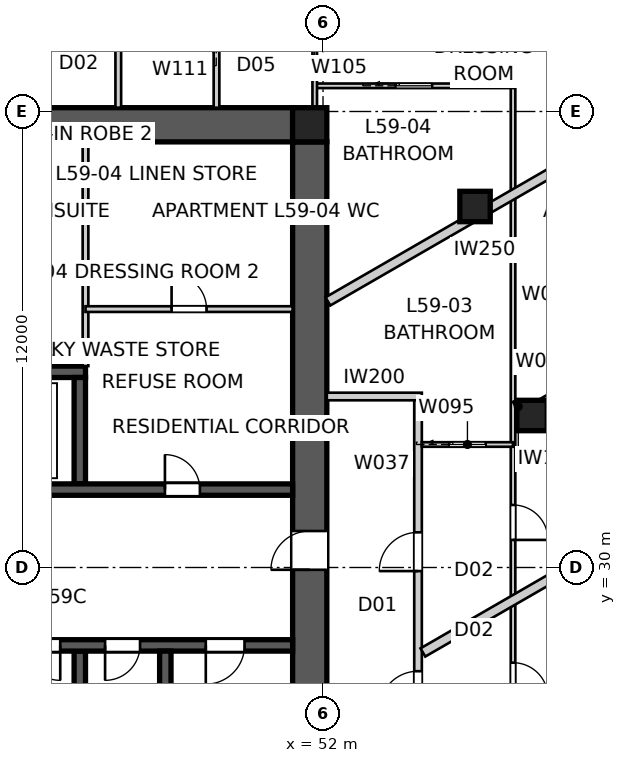
"""IFC4 building model, lengths in metres.
Left out: names, types, materials, properties, quantities, classifications, styles, units other than length and angle.
Written with IfcOpenShell. Run it as: python <this file> out.ifc"""

import sys

from ifc_helpers import new_model, si_unit, direction, frame, frame_2d, origin, origin_2d, place, context, subcontext, project, spatial, polyline, rectangle, outline, extrude, element, fill, save


model = new_model("IFC4")
c1 = context("Model", 3, precision=1e-05, world=origin(), true_north=direction((0.0, 1.0)))
c2 = subcontext(c1, "Body", "Model", "MODEL_VIEW")
j1 = project(units=[si_unit("LENGTHUNIT", "METRE"), si_unit("PLANEANGLEUNIT", "RADIAN")], contexts=[c1])
p1 = place(None, origin())
s1 = spatial("IfcSite", under=j1, at=p1, CompositionType="ELEMENT")
p2 = place(p1, origin())
s2 = spatial("IfcBuilding", under=s1, at=p2, CompositionType="ELEMENT")
p3 = place(p2, frame((0.0, 0.0, 215.0)))
s3 = spatial("IfcBuildingStorey", under=s2, at=p3, CompositionType="ELEMENT", Elevation=215.0)
p4 = place(p3, frame((28.8, 41.65, 0.0), z_axis=(0.0, 0.0, 1.0), x_axis=(1.0, 0.0, 0.0)))
e1 = element("IfcWall", 1, at=p4, inside=s3, PredefinedType="SHEAR", context=c2, shape_type="SweptSolid", body=[
    extrude(outline(polyline([(0.0, -0.45), (22.4, -0.45), (22.4, -0.025), (22.85, -0.025), (22.85, 0.025), (22.4, 0.025), (22.4, 0.45), (0.0, 0.45), (0.0, 0.025), (-0.45, 0.025), (-0.45, -0.025), (0.0, -0.025), (0.0, -0.45)])), origin(), (0.0, 0.0, 1.0), 3.4),
])
p5 = place(p3, frame((51.65, 18.8, 0.0), z_axis=(0.0, 0.0, 1.0), x_axis=(0.0, 1.0, 0.0)))
e2 = element("IfcWall", 2, at=p5, inside=s3, PredefinedType="SHEAR", context=c2, shape_type="SweptSolid", body=[
    extrude(outline(polyline([(0.0, -0.45), (22.4, -0.45), (22.4, -0.025), (22.85, -0.025), (22.85, 0.025), (22.4, 0.025), (22.4, 0.45), (0.0, 0.45), (0.0, 0.025), (-0.45, 0.025), (-0.45, -0.025), (0.0, -0.025), (0.0, -0.45)])), origin(), (0.0, 0.0, 1.0), 3.4),
])
p6 = place(p5, frame((11.14, 0.0, 0.0)))
e3 = element("IfcOpeningElement", 3, at=p6, cuts=e2, PredefinedType="OPENING", context=c2, shape_type="SweptSolid", body=[
    extrude(rectangle(XDim=1.02, YDim=2.4, at=frame_2d((0.51, 1.2))), frame((0.0, 0.46, 0.0), z_axis=(0.0, -1.0, 0.0), x_axis=(1.0, 0.0, 0.0)), (0.0, 0.0, 1.0), 0.92),
])
p7 = place(p3, frame((28.8, 32.05, 0.0), z_axis=(0.0, 0.0, 1.0), x_axis=(1.0, 0.0, 0.0)))
e4 = element("IfcWall", 4, at=p7, inside=s3, PredefinedType="SHEAR", context=c2, shape_type="SweptSolid", body=[
    extrude(rectangle(XDim=22.4, YDim=0.3, at=frame_2d((11.2, 0.0))), origin(), (0.0, 0.0, 1.0), 3.4),
])
p8 = place(p7, frame((19.04, 0.0, 0.0)))
e5 = element("IfcOpeningElement", 5, at=p8, cuts=e4, PredefinedType="OPENING", context=c2, shape_type="SweptSolid", body=[
    extrude(rectangle(XDim=0.92, YDim=2.1, at=frame_2d((0.46, 1.05))), frame((0.0, 0.16, 0.0), z_axis=(0.0, -1.0, 0.0), x_axis=(1.0, 0.0, 0.0)), (0.0, 0.0, 1.0), 0.32),
])
p9 = place(p7, frame((1.265, 0.0, 0.0)))
e6 = element("IfcOpeningElement", 6, at=p9, cuts=e4, PredefinedType="OPENING", context=c2, shape_type="SweptSolid", body=[
    extrude(rectangle(XDim=1.02, YDim=2.1, at=frame_2d((0.51, 1.05))), frame((0.0, 0.16, 0.0), z_axis=(0.0, -1.0, 0.0), x_axis=(1.0, 0.0, 0.0)), (0.0, 0.0, 1.0), 0.32),
])
p10 = place(p7, frame((4.015, 0.0, 0.0)))
e7 = element("IfcOpeningElement", 7, at=p10, cuts=e4, PredefinedType="OPENING", context=c2, shape_type="SweptSolid", body=[
    extrude(rectangle(XDim=0.92, YDim=2.1, at=frame_2d((0.46, 1.05))), frame((0.0, 0.16, 0.0), z_axis=(0.0, -1.0, 0.0), x_axis=(1.0, 0.0, 0.0)), (0.0, 0.0, 1.0), 0.32),
])
p11 = place(p7, frame((7.015, 0.0, 0.0)))
e8 = element("IfcOpeningElement", 8, at=p11, cuts=e4, PredefinedType="OPENING", context=c2, shape_type="SweptSolid", body=[
    extrude(rectangle(XDim=0.92, YDim=2.1, at=frame_2d((0.46, 1.05))), frame((0.0, 0.16, 0.0), z_axis=(0.0, -1.0, 0.0), x_axis=(1.0, 0.0, 0.0)), (0.0, 0.0, 1.0), 0.32),
])
p12 = place(p7, frame((9.34, 0.0, 0.0)))
e9 = element("IfcOpeningElement", 9, at=p12, cuts=e4, PredefinedType="OPENING", context=c2, shape_type="SweptSolid", body=[
    extrude(rectangle(XDim=0.92, YDim=2.1, at=frame_2d((0.46, 1.05))), frame((0.0, 0.16, 0.0), z_axis=(0.0, -1.0, 0.0), x_axis=(1.0, 0.0, 0.0)), (0.0, 0.0, 1.0), 0.32),
])
p13 = place(p7, frame((12.05, 0.0, 0.0)))
e10 = element("IfcOpeningElement", 10, at=p13, cuts=e4, PredefinedType="OPENING", context=c2, shape_type="SweptSolid", body=[
    extrude(rectangle(XDim=1.1, YDim=2.1, at=frame_2d((0.55, 1.05))), frame((0.0, 0.16, 0.0), z_axis=(0.0, -1.0, 0.0), x_axis=(1.0, 0.0, 0.0)), (0.0, 0.0, 1.0), 0.32),
])
p14 = place(p7, frame((14.85, 0.0, 0.0)))
e11 = element("IfcOpeningElement", 11, at=p14, cuts=e4, PredefinedType="OPENING", context=c2, shape_type="SweptSolid", body=[
    extrude(rectangle(XDim=1.1, YDim=2.1, at=frame_2d((0.55, 1.05))), frame((0.0, 0.16, 0.0), z_axis=(0.0, -1.0, 0.0), x_axis=(1.0, 0.0, 0.0)), (0.0, 0.0, 1.0), 0.32),
])
p15 = place(p3, frame((51.2, 27.95, 0.0), z_axis=(0.0, 0.0, 1.0), x_axis=(-1.0, 0.0, 0.0)))
e12 = element("IfcWall", 12, at=p15, inside=s3, PredefinedType="SHEAR", context=c2, shape_type="SweptSolid", body=[
    extrude(rectangle(XDim=22.4, YDim=0.3, at=frame_2d((11.2, 0.0))), origin(), (0.0, 0.0, 1.0), 3.4),
])
p16 = place(p15, frame((19.04, 0.0, 0.0)))
e13 = element("IfcOpeningElement", 13, at=p16, cuts=e12, PredefinedType="OPENING", context=c2, shape_type="SweptSolid", body=[
    extrude(rectangle(XDim=0.92, YDim=2.1, at=frame_2d((0.46, 1.05))), frame((0.0, 0.16, 0.0), z_axis=(0.0, -1.0, 0.0), x_axis=(1.0, 0.0, 0.0)), (0.0, 0.0, 1.0), 0.32),
])
p17 = place(p15, frame((1.265, 0.0, 0.0)))
e14 = element("IfcOpeningElement", 14, at=p17, cuts=e12, PredefinedType="OPENING", context=c2, shape_type="SweptSolid", body=[
    extrude(rectangle(XDim=1.02, YDim=2.1, at=frame_2d((0.51, 1.05))), frame((0.0, 0.16, 0.0), z_axis=(0.0, -1.0, 0.0), x_axis=(1.0, 0.0, 0.0)), (0.0, 0.0, 1.0), 0.32),
])
p18 = place(p15, frame((4.015, 0.0, 0.0)))
e15 = element("IfcOpeningElement", 15, at=p18, cuts=e12, PredefinedType="OPENING", context=c2, shape_type="SweptSolid", body=[
    extrude(rectangle(XDim=0.92, YDim=2.1, at=frame_2d((0.46, 1.05))), frame((0.0, 0.16, 0.0), z_axis=(0.0, -1.0, 0.0), x_axis=(1.0, 0.0, 0.0)), (0.0, 0.0, 1.0), 0.32),
])
p19 = place(p15, frame((9.79, 0.0, 0.0)))
e16 = element("IfcOpeningElement", 16, at=p19, cuts=e12, PredefinedType="OPENING", context=c2, shape_type="SweptSolid", body=[
    extrude(rectangle(XDim=0.92, YDim=2.1, at=frame_2d((0.46, 1.05))), frame((0.0, 0.16, 0.0), z_axis=(0.0, -1.0, 0.0), x_axis=(1.0, 0.0, 0.0)), (0.0, 0.0, 1.0), 0.32),
])
p20 = place(p15, frame((6.115, 0.0, 0.0)))
e17 = element("IfcOpeningElement", 17, at=p20, cuts=e12, PredefinedType="OPENING", context=c2, shape_type="SweptSolid", body=[
    extrude(rectangle(XDim=0.92, YDim=2.1, at=frame_2d((0.46, 1.05))), frame((0.0, 0.16, 0.0), z_axis=(0.0, -1.0, 0.0), x_axis=(1.0, 0.0, 0.0)), (0.0, 0.0, 1.0), 0.32),
])
p21 = place(p15, frame((12.05, 0.0, 0.0)))
e18 = element("IfcOpeningElement", 18, at=p21, cuts=e12, PredefinedType="OPENING", context=c2, shape_type="SweptSolid", body=[
    extrude(rectangle(XDim=1.1, YDim=2.1, at=frame_2d((0.55, 1.05))), frame((0.0, 0.16, 0.0), z_axis=(0.0, -1.0, 0.0), x_axis=(1.0, 0.0, 0.0)), (0.0, 0.0, 1.0), 0.32),
])
p22 = place(p15, frame((14.85, 0.0, 0.0)))
e19 = element("IfcOpeningElement", 19, at=p22, cuts=e12, PredefinedType="OPENING", context=c2, shape_type="SweptSolid", body=[
    extrude(rectangle(XDim=1.1, YDim=2.1, at=frame_2d((0.55, 1.05))), frame((0.0, 0.16, 0.0), z_axis=(0.0, -1.0, 0.0), x_axis=(1.0, 0.0, 0.0)), (0.0, 0.0, 1.0), 0.32),
])
p23 = place(p3, frame((34.25, 35.15, 0.0), z_axis=(0.0, 0.0, 1.0), x_axis=(1.0, 0.0, 0.0)))
e20 = element("IfcWall", 20, at=p23, inside=s3, PredefinedType="SHEAR", context=c2, shape_type="SweptSolid", body=[
    extrude(rectangle(XDim=11.5, YDim=0.3, at=frame_2d((5.75, 0.0))), origin(), (0.0, 0.0, 1.0), 3.4),
])
for number, where, z_axis, x_axis in (
    (21, (45.6, 27.8, 0.0), (0.0, 0.0, 1.0), (0.0, -1.0, 0.0)),
    (22, (45.6, 32.2, 0.0), (0.0, 0.0, 1.0), (0.0, 1.0, 0.0)),
):
    element("IfcWall", number, at=place(p3, frame(where, z_axis=z_axis, x_axis=x_axis)), inside=s3, PredefinedType="SHEAR", context=c2, shape_type="SweptSolid", body=[
        extrude(rectangle(XDim=2.8, YDim=0.3, at=frame_2d((1.4, 0.0))), origin(), (0.0, 0.0, 1.0), 3.4),
    ])
p24 = place(p3, frame((47.85, 27.8, 0.0), z_axis=(0.0, 0.0, 1.0), x_axis=(0.0, -1.0, 0.0)))
e23 = element("IfcWall", 23, at=p24, inside=s3, PredefinedType="SHEAR", context=c2, shape_type="SweptSolid", body=[
    extrude(rectangle(XDim=7.7, YDim=0.3, at=frame_2d((3.85, 0.0))), origin(), (0.0, 0.0, 1.0), 3.4),
])
p25 = place(p3, frame((51.65, 41.65, 0.0), z_axis=(0.0, 0.0, 1.0), x_axis=(1.0, 0.0, 0.0)))
e24 = element("IfcColumn", 24, at=p25, inside=s3, PredefinedType="COLUMN", context=c2, shape_type="SweptSolid", body=[
    extrude(rectangle(XDim=0.9, YDim=0.9, at=origin_2d()), origin(), (0.0, 0.0, 1.0), 3.4),
])
for number, where, z_axis, x_axis in (
    (25, (57.5, 34.0, 0.0), (0.0, 0.0, 1.0), (1.0, 0.0, 0.0)),
    (26, (56.0, 39.5, 0.0), (0.0, 0.0, 1.0), (1.0, 0.0, 0.0)),
):
    element("IfcColumn", number, at=place(p3, frame(where, z_axis=z_axis, x_axis=x_axis)), inside=s3, PredefinedType="COLUMN", context=c2, shape_type="SweptSolid", body=[
        extrude(rectangle(XDim=0.8, YDim=0.8, at=origin_2d()), origin(), (0.0, 0.0, 1.0), 3.4),
    ])
p26 = place(p3, frame((54.5, 25.5, 0.0), z_axis=(0.0, 0.0, 1.0), x_axis=(0.0, 1.0, 0.0)))
e27 = element("IfcWall", 27, at=p26, inside=s3, PredefinedType="PARTITIONING", context=c2, shape_type="SweptSolid", body=[
    extrude(rectangle(XDim=9.0, YDim=0.2, at=frame_2d((4.5, 0.0))), origin(), (0.0, 0.0, 1.0), 3.25),
])
p27 = place(p26, frame((4.406, 0.0, 0.0)))
e28 = element("IfcOpeningElement", 28, at=p27, cuts=e27, PredefinedType="OPENING", context=c2, shape_type="SweptSolid", body=[
    extrude(rectangle(XDim=1.02, YDim=2.34, at=frame_2d((0.51, 1.17))), frame((0.0, 0.11, 0.0), z_axis=(0.0, -1.0, 0.0), x_axis=(1.0, 0.0, 0.0)), (0.0, 0.0, 1.0), 0.22),
])
p28 = place(p26, frame((0.751, 0.0, 0.0)))
e29 = element("IfcOpeningElement", 29, at=p28, cuts=e27, PredefinedType="OPENING", context=c2, shape_type="SweptSolid", body=[
    extrude(rectangle(XDim=1.02, YDim=2.34, at=frame_2d((0.51, 1.17))), frame((0.0, 0.11, 0.0), z_axis=(0.0, -1.0, 0.0), x_axis=(1.0, 0.0, 0.0)), (0.0, 0.0, 1.0), 0.22),
])
p29 = place(p3, frame((52.1, 34.5, 0.0), z_axis=(0.0, 0.0, 1.0), x_axis=(1.0, 0.0, 0.0)))
e30 = element("IfcWall", 30, at=p29, inside=s3, PredefinedType="PARTITIONING", context=c2, shape_type="SweptSolid", body=[
    extrude(rectangle(XDim=2.5, YDim=0.2, at=frame_2d((1.25, 0.0))), origin(), (0.0, 0.0, 1.0), 3.25),
])
p30 = place(p3, frame((59.486, 41.25, 0.0), z_axis=(0.0, 0.0, 1.0), x_axis=(-0.866020489494, -0.500008511703, 0.0)))
e31 = element("IfcWall", 31, at=p30, inside=s3, PredefinedType="PARTITIONING", context=c2, shape_type="SweptSolid", body=[
    extrude(rectangle(XDim=8.496, YDim=0.25, at=frame_2d((4.248, 0.0))), origin(), (0.0, 0.0, 1.0), 3.25),
])
p31 = place(p3, frame((64.111, 33.239, 0.0), z_axis=(0.0, 0.0, 1.0), x_axis=(-0.866024069551, -0.500002310952, 0.0)))
e32 = element("IfcWall", 32, at=p31, inside=s3, PredefinedType="PARTITIONING", context=c2, shape_type="SweptSolid", body=[
    extrude(rectangle(XDim=10.95, YDim=0.25, at=frame_2d((5.475, 0.0))), origin(), (0.0, 0.0, 1.0), 3.25),
])
p32 = place(p3, frame((45.75, 41.2, 0.0), z_axis=(0.0, 0.0, 1.0), x_axis=(0.0, -1.0, 0.0)))
e33 = element("IfcWall", 33, at=p32, inside=s3, PredefinedType="SOLIDWALL", context=c2, shape_type="SweptSolid", body=[
    extrude(rectangle(XDim=5.9, YDim=0.15, at=frame_2d((2.95, 0.0))), origin(), (0.0, 0.0, 1.0), 3.25),
])
p33 = place(p3, frame((45.75, 36.8, 0.0), z_axis=(0.0, 0.0, 1.0), x_axis=(1.0, 0.0, 0.0)))
e34 = element("IfcWall", 34, at=p33, inside=s3, PredefinedType="SOLIDWALL", context=c2, shape_type="SweptSolid", body=[
    extrude(rectangle(XDim=5.45, YDim=0.15, at=frame_2d((2.725, 0.0))), origin(), (0.0, 0.0, 1.0), 3.25),
])
p34 = place(p33, frame((2.265, 0.0, 0.0)))
e35 = element("IfcOpeningElement", 35, at=p34, cuts=e34, PredefinedType="OPENING", context=c2, shape_type="SweptSolid", body=[
    extrude(rectangle(XDim=0.92, YDim=2.1, at=frame_2d((0.46, 1.05))), frame((0.0, 0.085, 0.0), z_axis=(0.0, -1.0, 0.0), x_axis=(1.0, 0.0, 0.0)), (0.0, 0.0, 1.0), 0.17),
])
p35 = place(p3, frame((57.0, 42.676, 0.0), z_axis=(0.0, 0.0, 1.0), x_axis=(0.0, -1.0, 0.0)))
e36 = element("IfcWall", 36, at=p35, inside=s3, PredefinedType="PARTITIONING", context=c2, shape_type="SweptSolid", body=[
    extrude(rectangle(XDim=23.19, YDim=0.12, at=frame_2d((11.595, 0.0))), origin(), (0.0, 0.0, 1.0), 2.55),
])
p36 = place(p35, frame((11.03, 0.0, 0.0)))
e37 = element("IfcOpeningElement", 37, at=p36, cuts=e36, PredefinedType="OPENING", context=c2, shape_type="SweptSolid", body=[
    extrude(rectangle(XDim=0.92, YDim=2.34, at=frame_2d((0.46, 1.17))), frame((0.0, 0.07, 0.0), z_axis=(0.0, -1.0, 0.0), x_axis=(1.0, 0.0, 0.0)), (0.0, 0.0, 1.0), 0.14),
])
p37 = place(p35, frame((15.181, 0.0, 0.0)))
e38 = element("IfcOpeningElement", 38, at=p37, cuts=e36, PredefinedType="OPENING", context=c2, shape_type="SweptSolid", body=[
    extrude(rectangle(XDim=0.92, YDim=2.34, at=frame_2d((0.46, 1.17))), frame((0.0, 0.07, 0.0), z_axis=(0.0, -1.0, 0.0), x_axis=(1.0, 0.0, 0.0)), (0.0, 0.0, 1.0), 0.14),
])
p38 = place(p3, frame((54.6, 33.237, 0.0), z_axis=(0.0, 0.0, 1.0), x_axis=(1.0, 0.0, 0.0)))
e39 = element("IfcWall", 39, at=p38, inside=s3, PredefinedType="PARTITIONING", context=c2, shape_type="SweptSolid", body=[
    extrude(rectangle(XDim=2.4, YDim=0.12, at=frame_2d((1.2, 0.0))), origin(), (0.0, 0.0, 1.0), 3.25),
])
p39 = place(p38, frame((0.72, 0.0, 0.0)))
e40 = element("IfcOpeningElement", 40, at=p39, cuts=e39, PredefinedType="OPENING", context=c2, shape_type="SweptSolid", body=[
    extrude(rectangle(XDim=0.96, YDim=2.1, at=frame_2d((0.48, 1.05))), frame((0.0, 0.07, 0.0), z_axis=(0.0, -1.0, 0.0), x_axis=(1.0, 0.0, 0.0)), (0.0, 0.0, 1.0), 0.14),
])
p40 = place(p3, frame((57.05, 34.388, 0.0), z_axis=(0.0, 0.0, 1.0), x_axis=(0.49996389635, -0.866046247233, 0.0)))
e41 = element("IfcWall", 41, at=p40, inside=s3, PredefinedType="PARTITIONING", context=c2, shape_type="SweptSolid", body=[
    extrude(rectangle(XDim=0.35, YDim=0.12, at=frame_2d((0.175, 0.0))), origin(), (0.0, 0.0, 1.0), 3.25),
])
p41 = place(p3, frame((57.225, 34.085, 0.0), z_axis=(0.0, 0.0, 1.0), x_axis=(0.866019274569, 0.500010615962, 0.0)))
e42 = element("IfcWall", 42, at=p41, inside=s3, PredefinedType="PARTITIONING", context=c2, shape_type="SweptSolid", body=[
    extrude(rectangle(XDim=5.5, YDim=0.12, at=frame_2d((2.75, 0.0))), origin(), (0.0, 0.0, 1.0), 3.25),
])
p42 = place(p41, frame((2.31, 0.0, 0.0)))
e43 = element("IfcOpeningElement", 43, at=p42, cuts=e42, PredefinedType="OPENING", context=c2, shape_type="SweptSolid", body=[
    extrude(rectangle(XDim=0.92, YDim=2.34, at=frame_2d((0.46, 1.17))), frame((0.0, 0.07, 0.0), z_axis=(0.0, -1.0, 0.0), x_axis=(1.0, 0.0, 0.0)), (0.0, 0.0, 1.0), 0.14),
])
p43 = place(p3, frame((51.782, 42.676, 0.0), z_axis=(0.0, 0.0, 1.0), x_axis=(1.0, 0.0, 0.0)))
e44 = element("IfcWall", 44, at=p43, inside=s3, PredefinedType="PARTITIONING", context=c2, shape_type="SweptSolid", body=[
    extrude(rectangle(XDim=5.218, YDim=0.12, at=frame_2d((2.609, 0.0))), origin(), (0.0, 0.0, 1.0), 3.25),
])
p44 = place(p43, frame((2.129, 0.0, 0.0)))
e45 = element("IfcOpeningElement", 45, at=p44, cuts=e44, PredefinedType="OPENING", context=c2, shape_type="SweptSolid", body=[
    extrude(rectangle(XDim=0.96, YDim=2.1, at=frame_2d((0.48, 1.05))), frame((0.0, 0.07, 0.0), z_axis=(0.0, -1.0, 0.0), x_axis=(1.0, 0.0, 0.0)), (0.0, 0.0, 1.0), 0.14),
])
p45 = place(p3, frame((51.782, 41.18, 0.0), z_axis=(0.0, 0.0, 1.0), x_axis=(0.0, 1.0, 0.0)))
e46 = element("IfcWall", 46, at=p45, inside=s3, PredefinedType="PARTITIONING", context=c2, shape_type="SweptSolid", body=[
    extrude(rectangle(XDim=5.82, YDim=0.12, at=frame_2d((2.91, 0.0))), origin(), (0.0, 0.0, 1.0), 3.25),
])
p46 = place(p45, frame((3.178, 0.0, 0.0)))
e47 = element("IfcOpeningElement", 47, at=p46, cuts=e46, PredefinedType="OPENING", context=c2, shape_type="SweptSolid", body=[
    extrude(rectangle(XDim=0.96, YDim=2.1, at=frame_2d((0.48, 1.05))), frame((0.0, 0.07, 0.0), z_axis=(0.0, -1.0, 0.0), x_axis=(1.0, 0.0, 0.0)), (0.0, 0.0, 1.0), 0.14),
])
p47 = place(p3, frame((46.612, 47.0, 0.0), z_axis=(0.0, 0.0, 1.0), x_axis=(0.0, -1.0, 0.0)))
e48 = element("IfcWall", 48, at=p47, inside=s3, PredefinedType="SOLIDWALL", context=c2, shape_type="SweptSolid", body=[
    extrude(rectangle(XDim=4.9, YDim=0.15, at=frame_2d((2.45, 0.0))), origin(), (0.0, 0.0, 1.0), 3.25),
])
p48 = place(p47, frame((1.99, 0.0, 0.0)))
e49 = element("IfcOpeningElement", 49, at=p48, cuts=e48, PredefinedType="OPENING", context=c2, shape_type="SweptSolid", body=[
    extrude(rectangle(XDim=0.92, YDim=2.34, at=frame_2d((0.46, 1.17))), frame((0.0, 0.085, 0.0), z_axis=(0.0, -1.0, 0.0), x_axis=(1.0, 0.0, 0.0)), (0.0, 0.0, 1.0), 0.17),
])
p49 = place(p3, frame((49.197, 42.1, 0.0), z_axis=(0.0, 0.0, 1.0), x_axis=(0.0, 1.0, 0.0)))
e50 = element("IfcWall", 50, at=p49, inside=s3, PredefinedType="SOLIDWALL", context=c2, shape_type="SweptSolid", body=[
    extrude(rectangle(XDim=4.9, YDim=0.15, at=frame_2d((2.45, 0.0))), origin(), (0.0, 0.0, 1.0), 3.25),
])
p50 = place(p49, frame((1.97, 0.0, 0.0)))
e51 = element("IfcOpeningElement", 51, at=p50, cuts=e50, PredefinedType="OPENING", context=c2, shape_type="SweptSolid", body=[
    extrude(rectangle(XDim=0.96, YDim=2.1, at=frame_2d((0.48, 1.05))), frame((0.0, 0.085, 0.0), z_axis=(0.0, -1.0, 0.0), x_axis=(1.0, 0.0, 0.0)), (0.0, 0.0, 1.0), 0.17),
])
p51 = place(p8, origin())
e52 = element("IfcDoor", 52, at=p51, inside=s3, OperationType="SINGLE_SWING_LEFT", PredefinedType="DOOR", context=c2, shape_type="SweptSolid", body=[
    extrude(rectangle(XDim=0.92, YDim=2.1, at=frame_2d((0.46, 1.05))), frame((0.0, 0.025, 0.0), z_axis=(0.0, -1.0, 0.0), x_axis=(1.0, 0.0, 0.0)), (0.0, 0.0, 1.0), 0.05),
])
fill(e5, e52)
p52 = place(p17, origin())
e53 = element("IfcDoor", 53, at=p52, inside=s3, OperationType="SINGLE_SWING_RIGHT", PredefinedType="DOOR", context=c2, shape_type="SweptSolid", body=[
    extrude(rectangle(XDim=1.02, YDim=2.1, at=frame_2d((0.51, 1.05))), frame((0.0, 0.025, 0.0), z_axis=(0.0, -1.0, 0.0), x_axis=(1.0, 0.0, 0.0)), (0.0, 0.0, 1.0), 0.05),
])
fill(e14, e53)
p53 = place(p18, origin())
e54 = element("IfcDoor", 54, at=p53, inside=s3, OperationType="SINGLE_SWING_RIGHT", PredefinedType="DOOR", context=c2, shape_type="SweptSolid", body=[
    extrude(rectangle(XDim=0.92, YDim=2.1, at=frame_2d((0.46, 1.05))), frame((0.0, 0.025, 0.0), z_axis=(0.0, -1.0, 0.0), x_axis=(1.0, 0.0, 0.0)), (0.0, 0.0, 1.0), 0.05),
])
fill(e15, e54)
p54 = place(p27, origin())
e55 = element("IfcDoor", 55, at=p54, inside=s3, OperationType="SINGLE_SWING_LEFT", PredefinedType="DOOR", context=c2, shape_type="SweptSolid", body=[
    extrude(rectangle(XDim=1.02, YDim=2.34, at=frame_2d((0.51, 1.17))), frame((0.0, 0.025, 0.0), z_axis=(0.0, -1.0, 0.0), x_axis=(1.0, 0.0, 0.0)), (0.0, 0.0, 1.0), 0.05),
])
fill(e28, e55)
p55 = place(p28, origin())
e56 = element("IfcDoor", 56, at=p55, inside=s3, OperationType="SINGLE_SWING_LEFT", PredefinedType="DOOR", context=c2, shape_type="SweptSolid", body=[
    extrude(rectangle(XDim=1.02, YDim=2.34, at=frame_2d((0.51, 1.17))), frame((0.0, 0.025, 0.0), z_axis=(0.0, -1.0, 0.0), x_axis=(1.0, 0.0, 0.0)), (0.0, 0.0, 1.0), 0.05),
])
fill(e29, e56)
p56 = place(p34, origin())
e57 = element("IfcDoor", 57, at=p56, inside=s3, OperationType="SINGLE_SWING_LEFT", PredefinedType="DOOR", context=c2, shape_type="SweptSolid", body=[
    extrude(rectangle(XDim=0.92, YDim=2.1, at=frame_2d((0.46, 1.05))), frame((0.0, 0.025, 0.0), z_axis=(0.0, -1.0, 0.0), x_axis=(1.0, 0.0, 0.0)), (0.0, 0.0, 1.0), 0.05),
])
fill(e35, e57)
p57 = place(p36, origin())
e58 = element("IfcDoor", 58, at=p57, inside=s3, OperationType="SINGLE_SWING_RIGHT", PredefinedType="DOOR", context=c2, shape_type="SweptSolid", body=[
    extrude(rectangle(XDim=0.92, YDim=2.34, at=frame_2d((0.46, 1.17))), frame((0.0, 0.025, 0.0), z_axis=(0.0, -1.0, 0.0), x_axis=(1.0, 0.0, 0.0)), (0.0, 0.0, 1.0), 0.05),
])
fill(e37, e58)
p58 = place(p39, origin())
e59 = element("IfcDoor", 59, at=p58, inside=s3, OperationType="SLIDING_TO_LEFT", PredefinedType="DOOR", context=c2, shape_type="SweptSolid", body=[
    extrude(rectangle(XDim=0.96, YDim=2.1, at=frame_2d((0.48, 1.05))), frame((0.0, 0.025, 0.0), z_axis=(0.0, -1.0, 0.0), x_axis=(1.0, 0.0, 0.0)), (0.0, 0.0, 1.0), 0.05),
])
fill(e40, e59)
p59 = place(p37, origin())
e60 = element("IfcDoor", 60, at=p59, inside=s3, OperationType="SINGLE_SWING_RIGHT", PredefinedType="DOOR", context=c2, shape_type="SweptSolid", body=[
    extrude(rectangle(XDim=0.92, YDim=2.34, at=frame_2d((0.46, 1.17))), frame((0.0, 0.025, 0.0), z_axis=(0.0, -1.0, 0.0), x_axis=(1.0, 0.0, 0.0)), (0.0, 0.0, 1.0), 0.05),
])
fill(e38, e60)
p60 = place(p44, origin())
e61 = element("IfcDoor", 61, at=p60, inside=s3, OperationType="SLIDING_TO_LEFT", PredefinedType="DOOR", context=c2, shape_type="SweptSolid", body=[
    extrude(rectangle(XDim=0.96, YDim=2.1, at=frame_2d((0.48, 1.05))), frame((0.0, 0.025, 0.0), z_axis=(0.0, -1.0, 0.0), x_axis=(1.0, 0.0, 0.0)), (0.0, 0.0, 1.0), 0.05),
])
fill(e45, e61)
p61 = place(p20, origin())
e62 = element("IfcDoor", 62, at=p61, inside=s3, OperationType="SINGLE_SWING_LEFT", PredefinedType="DOOR", context=c2, shape_type="SweptSolid", body=[
    extrude(rectangle(XDim=0.92, YDim=2.1, at=frame_2d((0.46, 1.05))), frame((0.0, 0.025, 0.0), z_axis=(0.0, -1.0, 0.0), x_axis=(1.0, 0.0, 0.0)), (0.0, 0.0, 1.0), 0.05),
])
fill(e17, e62)
p62 = place(p6, origin())
e63 = element("IfcDoor", 63, at=p62, inside=s3, OperationType="SINGLE_SWING_LEFT", PredefinedType="DOOR", context=c2, shape_type="SweptSolid", body=[
    extrude(rectangle(XDim=1.02, YDim=2.4, at=frame_2d((0.51, 1.2))), frame((0.0, 0.025, 0.0), z_axis=(0.0, -1.0, 0.0), x_axis=(1.0, 0.0, 0.0)), (0.0, 0.0, 1.0), 0.05),
])
fill(e3, e63)
save(model, sys.argv[1])
